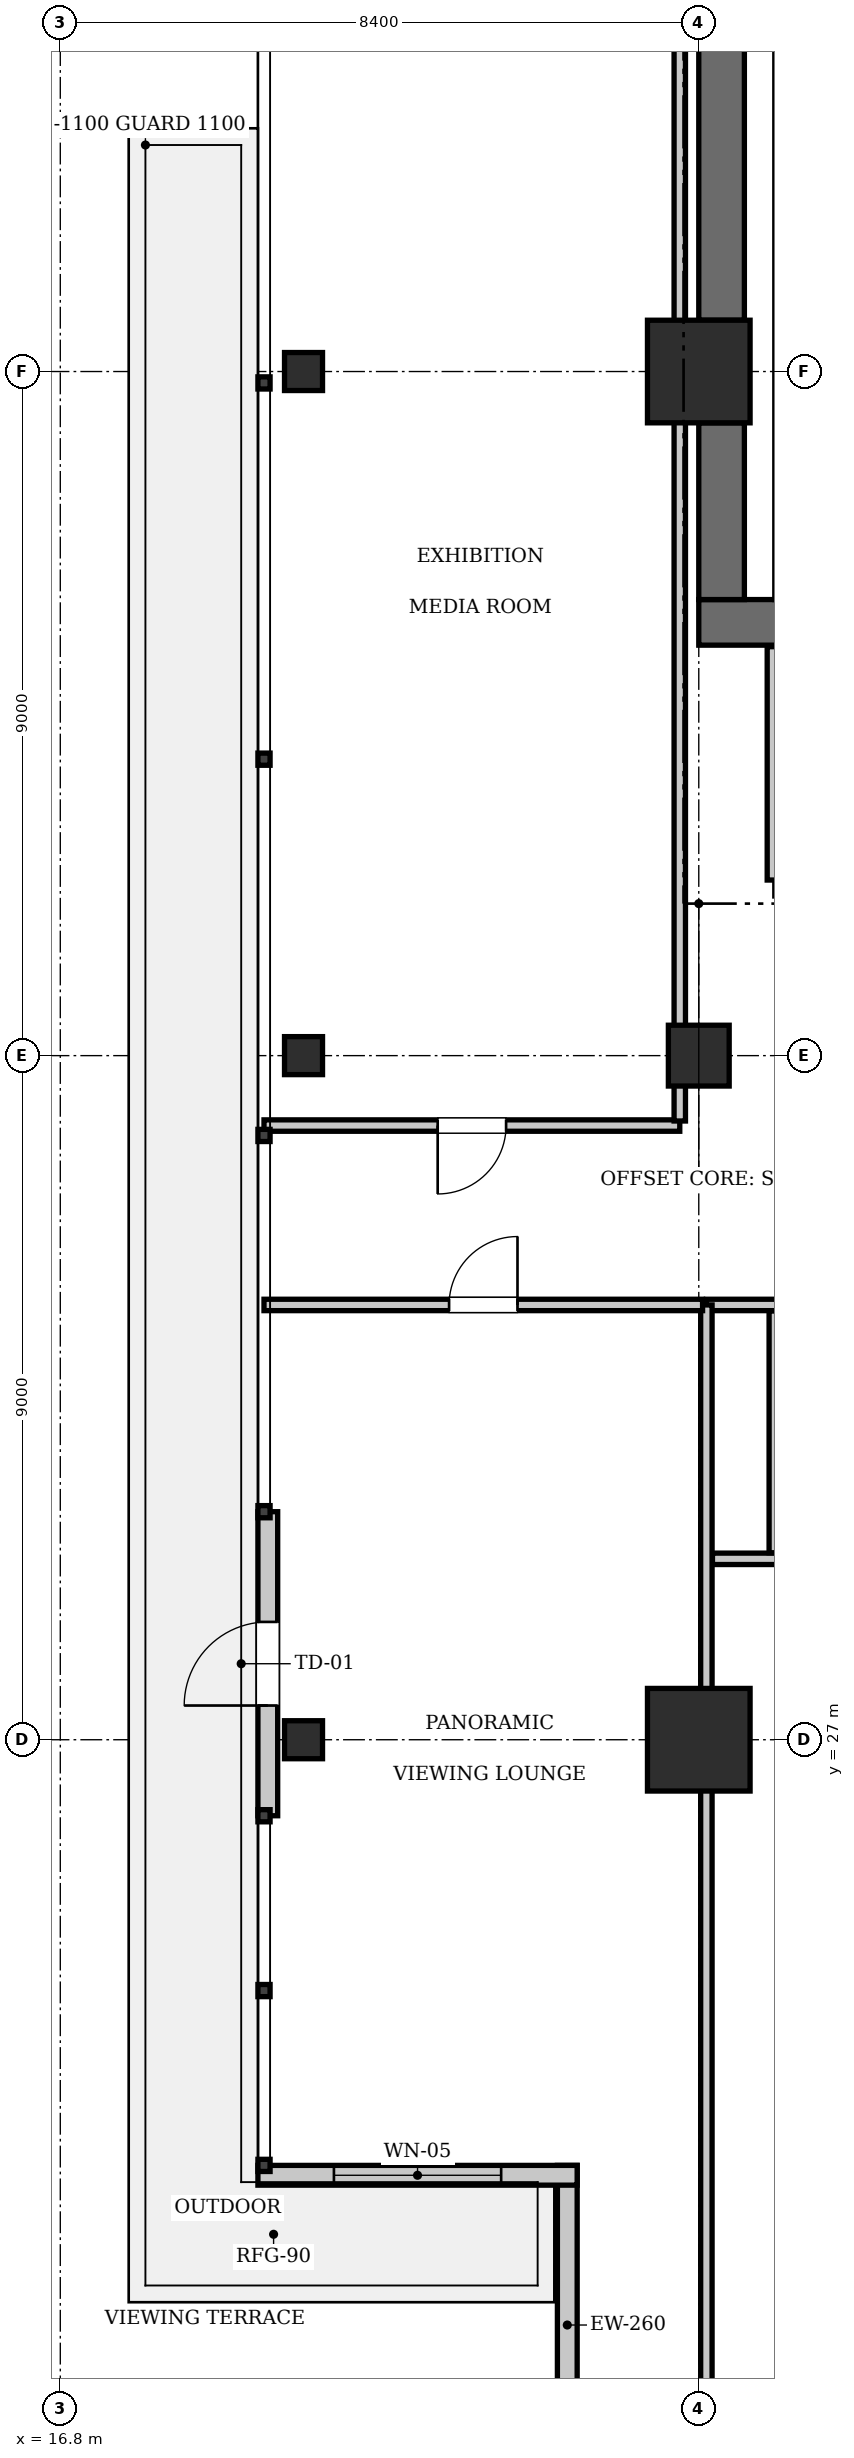
"""IFC4 building model, lengths in metres.
Left out: names, types, materials, properties, quantities, classifications, styles, units other than length and angle.
Written with IfcOpenShell. Run it as: python <this file> out.ifc"""

import sys

from ifc_helpers import new_model, si_unit, direction, frame, frame_2d, origin, origin_2d, place, context, subcontext, project, spatial, rectangle, i_section, extrude, element, fill, save


model = new_model("IFC4")
c1 = context("Model", 3, precision=1e-05, world=origin(), true_north=direction((0.0, 1.0)))
c2 = subcontext(c1, "Body", "Model", "MODEL_VIEW")
j1 = project(units=[si_unit("LENGTHUNIT", "METRE"), si_unit("PLANEANGLEUNIT", "RADIAN")], contexts=[c1])
p1 = place(None, origin())
s1 = spatial("IfcSite", under=j1, at=p1, CompositionType="ELEMENT")
p2 = place(p1, origin())
s2 = spatial("IfcBuilding", under=s1, at=p2, CompositionType="ELEMENT")
p3 = place(p2, frame((0.0, 0.0, 354.2)))
s3 = spatial("IfcBuildingStorey", under=s2, at=p3, CompositionType="ELEMENT", Elevation=354.2)
for number, where, z_axis, x_axis in (
    (1, (25.2, 27.0, 0.0), (0.0, 0.0, 1.0), (1.0, 0.0, 0.0)),
    (2, (25.2, 45.0, 0.0), (0.0, 0.0, 1.0), (1.0, 0.0, 0.0)),
):
    element("IfcColumn", number, at=place(p3, frame(where, z_axis=z_axis, x_axis=x_axis)), inside=s3, PredefinedType="COLUMN", context=c2, shape_type="SweptSolid", body=[
        extrude(rectangle(XDim=1.35, YDim=1.35, at=origin_2d()), origin(), (0.0, 0.0, 1.0), 4.9),
    ])
p4 = place(p3, frame((25.2, 41.7, 0.0), z_axis=(0.0, 0.0, 1.0), x_axis=(1.0, 0.0, 0.0)))
e3 = element("IfcWall", 3, at=p4, inside=s3, PredefinedType="SHEAR", context=c2, shape_type="SweptSolid", body=[
    extrude(rectangle(XDim=6.8, YDim=0.6, at=frame_2d((3.4, 0.0))), origin(), (0.0, 0.0, 1.0), 4.9),
])
p5 = place(p4, frame((1.65, 0.0, 0.0)))
e4 = element("IfcOpeningElement", 4, at=p5, cuts=e3, PredefinedType="OPENING", context=c2, shape_type="SweptSolid", body=[
    extrude(rectangle(XDim=1.15, YDim=2.15, at=frame_2d((0.575, 1.075))), frame((0.0, 0.31, 0.0), z_axis=(0.0, -1.0, 0.0), x_axis=(1.0, 0.0, 0.0)), (0.0, 0.0, 1.0), 0.62),
])
p6 = place(p4, frame((5.15, 0.0, 0.0)))
e5 = element("IfcOpeningElement", 5, at=p6, cuts=e3, PredefinedType="OPENING", context=c2, shape_type="SweptSolid", body=[
    extrude(rectangle(XDim=1.1, YDim=2.2, at=frame_2d((0.55, 1.1))), frame((0.0, 0.31, 0.0), z_axis=(0.0, -1.0, 0.0), x_axis=(1.0, 0.0, 0.0)), (0.0, 0.0, 1.0), 0.62),
])
p7 = place(p3, frame((25.5, 42.0, 0.0), z_axis=(0.0, 0.0, 1.0), x_axis=(0.0, 1.0, 0.0)))
e6 = element("IfcWall", 6, at=p7, inside=s3, PredefinedType="SHEAR", context=c2, shape_type="SweptSolid", body=[
    extrude(rectangle(XDim=2.325, YDim=0.6, at=frame_2d((1.163, 0.0))), origin(), (0.0, 0.0, 1.0), 4.9),
])
p8 = place(p3, frame((25.5, 45.675, 0.0), z_axis=(0.0, 0.0, 1.0), x_axis=(0.0, 1.0, 0.0)))
e7 = element("IfcWall", 7, at=p8, inside=s3, PredefinedType="SHEAR", context=c2, shape_type="SweptSolid", body=[
    extrude(rectangle(XDim=7.725, YDim=0.6, at=frame_2d((3.862, 0.0))), origin(), (0.0, 0.0, 1.0), 4.9),
])
p9 = place(p3, frame((25.2, 36.0, 0.0), z_axis=(0.0, 0.0, 1.0), x_axis=(1.0, 0.0, 0.0)))
e8 = element("IfcColumn", 8, at=p9, inside=s3, PredefinedType="COLUMN", context=c2, shape_type="SweptSolid", body=[
    extrude(rectangle(XDim=0.8, YDim=0.8, at=origin_2d()), origin(), (0.0, 0.0, 1.0), 4.9),
])
for number, where, z_axis, x_axis in (
    (9, (20.0, 27.0, -0.26), (0.0, 0.0, 1.0), (1.0, 0.0, 0.0)),
    (10, (20.0, 36.0, -0.26), (0.0, 0.0, 1.0), (1.0, 0.0, 0.0)),
    (11, (20.0, 45.0, -0.26), (0.0, 0.0, 1.0), (1.0, 0.0, 0.0)),
):
    element("IfcColumn", number, at=place(p3, frame(where, z_axis=z_axis, x_axis=x_axis)), inside=s3, PredefinedType="COLUMN", context=c2, shape_type="SweptSolid", body=[
        extrude(i_section(OverallWidth=0.5, OverallDepth=0.5, WebThickness=0.022, FlangeThickness=0.032, at=origin_2d()), origin(), (0.0, 0.0, 1.0), 5.16),
    ])
p10 = place(p3, frame((23.47, 17.2, 0.0), z_axis=(0.0, 0.0, 1.0), x_axis=(0.0, 1.0, 0.0)))
e12 = element("IfcWall", 12, at=p10, inside=s3, PredefinedType="SOLIDWALL", context=c2, shape_type="SweptSolid", body=[
    extrude(rectangle(XDim=4.2, YDim=0.26, at=frame_2d((2.1, 0.0))), origin(), (0.0, 0.0, 1.0), 4.64),
])
p11 = place(p3, frame((23.6, 21.27, 0.0), z_axis=(0.0, 0.0, 1.0), x_axis=(-1.0, 0.0, 0.0)))
e13 = element("IfcWall", 13, at=p11, inside=s3, PredefinedType="SOLIDWALL", context=c2, shape_type="SweptSolid", body=[
    extrude(rectangle(XDim=4.2, YDim=0.26, at=frame_2d((2.1, 0.0))), origin(), (0.0, 0.0, 1.0), 4.64),
])
p12 = place(p11, frame((1.0, 0.0, 0.9)))
e14 = element("IfcOpeningElement", 14, at=p12, cuts=e13, PredefinedType="OPENING", context=c2, shape_type="SweptSolid", body=[
    extrude(rectangle(XDim=2.2, YDim=2.8, at=frame_2d((1.1, 1.4))), frame((0.0, 0.14, 0.0), z_axis=(0.0, -1.0, 0.0), x_axis=(1.0, 0.0, 0.0)), (0.0, 0.0, 1.0), 0.28),
])
p13 = place(p3, frame((19.53, 26.0, 0.0), z_axis=(0.0, 0.0, 1.0), x_axis=(0.0, 1.0, 0.0)))
e15 = element("IfcWall", 15, at=p13, inside=s3, PredefinedType="SOLIDWALL", context=c2, shape_type="SweptSolid", body=[
    extrude(rectangle(XDim=4.0, YDim=0.26, at=frame_2d((2.0, 0.0))), origin(), (0.0, 0.0, 1.0), 4.64),
])
p14 = place(p13, frame((1.45, 0.0, 0.0)))
e16 = element("IfcOpeningElement", 16, at=p14, cuts=e15, PredefinedType="OPENING", context=c2, shape_type="SweptSolid", body=[
    extrude(rectangle(XDim=1.1, YDim=2.2, at=frame_2d((0.55, 1.1))), frame((0.0, 0.14, 0.0), z_axis=(0.0, -1.0, 0.0), x_axis=(1.0, 0.0, 0.0)), (0.0, 0.0, 1.0), 0.28),
])
p15 = place(p3, frame((26.2, 38.2, 0.0), z_axis=(0.0, 0.0, 1.0), x_axis=(1.0, 0.0, 0.0)))
e17 = element("IfcWall", 17, at=p15, inside=s3, PredefinedType="PARTITIONING", context=c2, shape_type="SweptSolid", body=[
    extrude(rectangle(XDim=5.8, YDim=0.2, at=frame_2d((2.9, 0.0))), origin(), (0.0, 0.0, 1.0), 4.64),
])
p16 = place(p15, frame((2.3, 0.0, 0.0)))
e18 = element("IfcOpeningElement", 18, at=p16, cuts=e17, PredefinedType="OPENING", context=c2, shape_type="SweptSolid", body=[
    extrude(rectangle(XDim=1.15, YDim=2.15, at=frame_2d((0.575, 1.075))), frame((0.0, 0.11, 0.0), z_axis=(0.0, -1.0, 0.0), x_axis=(1.0, 0.0, 0.0)), (0.0, 0.0, 1.0), 0.22),
])
p17 = place(p3, frame((26.2, 38.31, 0.0), z_axis=(0.0, 0.0, 1.0), x_axis=(0.0, 1.0, 0.0)))
e19 = element("IfcWall", 19, at=p17, inside=s3, PredefinedType="PARTITIONING", context=c2, shape_type="SweptSolid", body=[
    extrude(rectangle(XDim=3.07, YDim=0.2, at=frame_2d((1.535, 0.0))), origin(), (0.0, 0.0, 1.0), 4.64),
])
p18 = place(p3, frame((25.3, 32.72, 0.0), z_axis=(0.0, 0.0, 1.0), x_axis=(1.0, 0.0, 0.0)))
e20 = element("IfcWall", 20, at=p18, inside=s3, PredefinedType="PARTITIONING", context=c2, shape_type="SweptSolid", body=[
    extrude(rectangle(XDim=3.88, YDim=0.15, at=frame_2d((1.94, 0.0))), origin(), (0.0, 0.0, 1.0), 4.64),
])
p19 = place(p18, frame((1.2, 0.0, 0.0)))
e21 = element("IfcOpeningElement", 21, at=p19, cuts=e20, PredefinedType="OPENING", context=c2, shape_type="SweptSolid", body=[
    extrude(rectangle(XDim=0.9, YDim=2.1, at=frame_2d((0.45, 1.05))), frame((0.0, 0.085, 0.0), z_axis=(0.0, -1.0, 0.0), x_axis=(1.0, 0.0, 0.0)), (0.0, 0.0, 1.0), 0.17),
])
p20 = place(p3, frame((25.38, 29.38, 0.0), z_axis=(0.0, 0.0, 1.0), x_axis=(1.0, 0.0, 0.0)))
e22 = element("IfcWall", 22, at=p20, inside=s3, PredefinedType="PARTITIONING", context=c2, shape_type="SweptSolid", body=[
    extrude(rectangle(XDim=6.54, YDim=0.15, at=frame_2d((3.27, 0.0))), origin(), (0.0, 0.0, 1.0), 4.64),
])
p21 = place(p3, frame((26.2, 29.46, 0.0), z_axis=(0.0, 0.0, 1.0), x_axis=(0.0, 1.0, 0.0)))
e23 = element("IfcWall", 23, at=p21, inside=s3, PredefinedType="PARTITIONING", context=c2, shape_type="SweptSolid", body=[
    extrude(rectangle(XDim=3.18, YDim=0.15, at=frame_2d((1.59, 0.0))), origin(), (0.0, 0.0, 1.0), 4.64),
])
p22 = place(p3, frame((25.3, 17.28, 0.0), z_axis=(0.0, 0.0, 1.0), x_axis=(0.0, 1.0, 0.0)))
e24 = element("IfcWall", 24, at=p22, inside=s3, PredefinedType="PARTITIONING", context=c2, shape_type="SweptSolid", body=[
    extrude(rectangle(XDim=15.44, YDim=0.15, at=frame_2d((7.72, 0.0))), origin(), (0.0, 0.0, 1.0), 4.177),
])
p23 = place(p3, frame((19.48, 32.72, 0.0), z_axis=(0.0, 0.0, 1.0), x_axis=(1.0, 0.0, 0.0)))
e25 = element("IfcWall", 25, at=p23, inside=s3, PredefinedType="PARTITIONING", context=c2, shape_type="SweptSolid", body=[
    extrude(rectangle(XDim=5.77, YDim=0.15, at=frame_2d((2.885, 0.0))), origin(), (0.0, 0.0, 1.0), 4.64),
])
p24 = place(p23, frame((2.435, 0.0, 0.0)))
e26 = element("IfcOpeningElement", 26, at=p24, cuts=e25, PredefinedType="OPENING", context=c2, shape_type="SweptSolid", body=[
    extrude(rectangle(XDim=0.9, YDim=2.1, at=frame_2d((0.45, 1.05))), frame((0.0, 0.085, 0.0), z_axis=(0.0, -1.0, 0.0), x_axis=(1.0, 0.0, 0.0)), (0.0, 0.0, 1.0), 0.17),
])
p25 = place(p3, frame((19.48, 35.08, 0.0), z_axis=(0.0, 0.0, 1.0), x_axis=(1.0, 0.0, 0.0)))
e27 = element("IfcWall", 27, at=p25, inside=s3, PredefinedType="PARTITIONING", context=c2, shape_type="SweptSolid", body=[
    extrude(rectangle(XDim=5.47, YDim=0.15, at=frame_2d((2.735, 0.0))), origin(), (0.0, 0.0, 1.0), 4.64),
])
p26 = place(p25, frame((2.285, 0.0, 0.0)))
e28 = element("IfcOpeningElement", 28, at=p26, cuts=e27, PredefinedType="OPENING", context=c2, shape_type="SweptSolid", body=[
    extrude(rectangle(XDim=0.9, YDim=2.1, at=frame_2d((0.45, 1.05))), frame((0.0, 0.085, 0.0), z_axis=(0.0, -1.0, 0.0), x_axis=(1.0, 0.0, 0.0)), (0.0, 0.0, 1.0), 0.17),
])
p27 = place(p3, frame((24.95, 35.14, 0.0), z_axis=(0.0, 0.0, 1.0), x_axis=(0.0, 1.0, 0.0)))
e29 = element("IfcWall", 29, at=p27, inside=s3, PredefinedType="PARTITIONING", context=c2, shape_type="SweptSolid", body=[
    extrude(rectangle(XDim=18.78, YDim=0.15, at=frame_2d((9.39, 0.0))), origin(), (0.0, 0.0, 1.0), 4.64),
])
p28 = place(p12, origin())
e30 = element("IfcWindow", 30, at=p28, inside=s3, PartitioningType="SINGLE_PANEL", PredefinedType="WINDOW", context=c2, shape_type="SweptSolid", body=[
    extrude(rectangle(XDim=2.2, YDim=2.8, at=frame_2d((1.1, 1.4))), frame((0.0, 0.03, 0.0), z_axis=(0.0, -1.0, 0.0), x_axis=(1.0, 0.0, 0.0)), (0.0, 0.0, 1.0), 0.06),
])
fill(e14, e30)
p29 = place(p14, origin())
e31 = element("IfcDoor", 31, at=p29, inside=s3, OperationType="SINGLE_SWING_LEFT", PredefinedType="DOOR", context=c2, shape_type="SweptSolid", body=[
    extrude(rectangle(XDim=1.1, YDim=2.2, at=frame_2d((0.55, 1.1))), frame((0.0, 0.025, 0.0), z_axis=(0.0, -1.0, 0.0), x_axis=(1.0, 0.0, 0.0)), (0.0, 0.0, 1.0), 0.05),
])
fill(e16, e31)
p30 = place(p24, origin())
e32 = element("IfcDoor", 32, at=p30, inside=s3, OperationType="SINGLE_SWING_RIGHT", PredefinedType="DOOR", context=c2, shape_type="SweptSolid", body=[
    extrude(rectangle(XDim=0.9, YDim=2.1, at=frame_2d((0.45, 1.05))), frame((0.0, 0.025, 0.0), z_axis=(0.0, -1.0, 0.0), x_axis=(1.0, 0.0, 0.0)), (0.0, 0.0, 1.0), 0.05),
])
fill(e26, e32)
p31 = place(p26, frame((0.9, 0.0, 0.0), z_axis=(0.0, 0.0, 1.0), x_axis=(-1.0, 0.0, 0.0)))
e33 = element("IfcDoor", 33, at=p31, inside=s3, OperationType="SINGLE_SWING_RIGHT", PredefinedType="DOOR", context=c2, shape_type="SweptSolid", body=[
    extrude(rectangle(XDim=0.9, YDim=2.1, at=frame_2d((0.45, 1.05))), frame((0.0, 0.025, 0.0), z_axis=(0.0, -1.0, 0.0), x_axis=(1.0, 0.0, 0.0)), (0.0, 0.0, 1.0), 0.05),
])
fill(e28, e33)
save(model, sys.argv[1])
